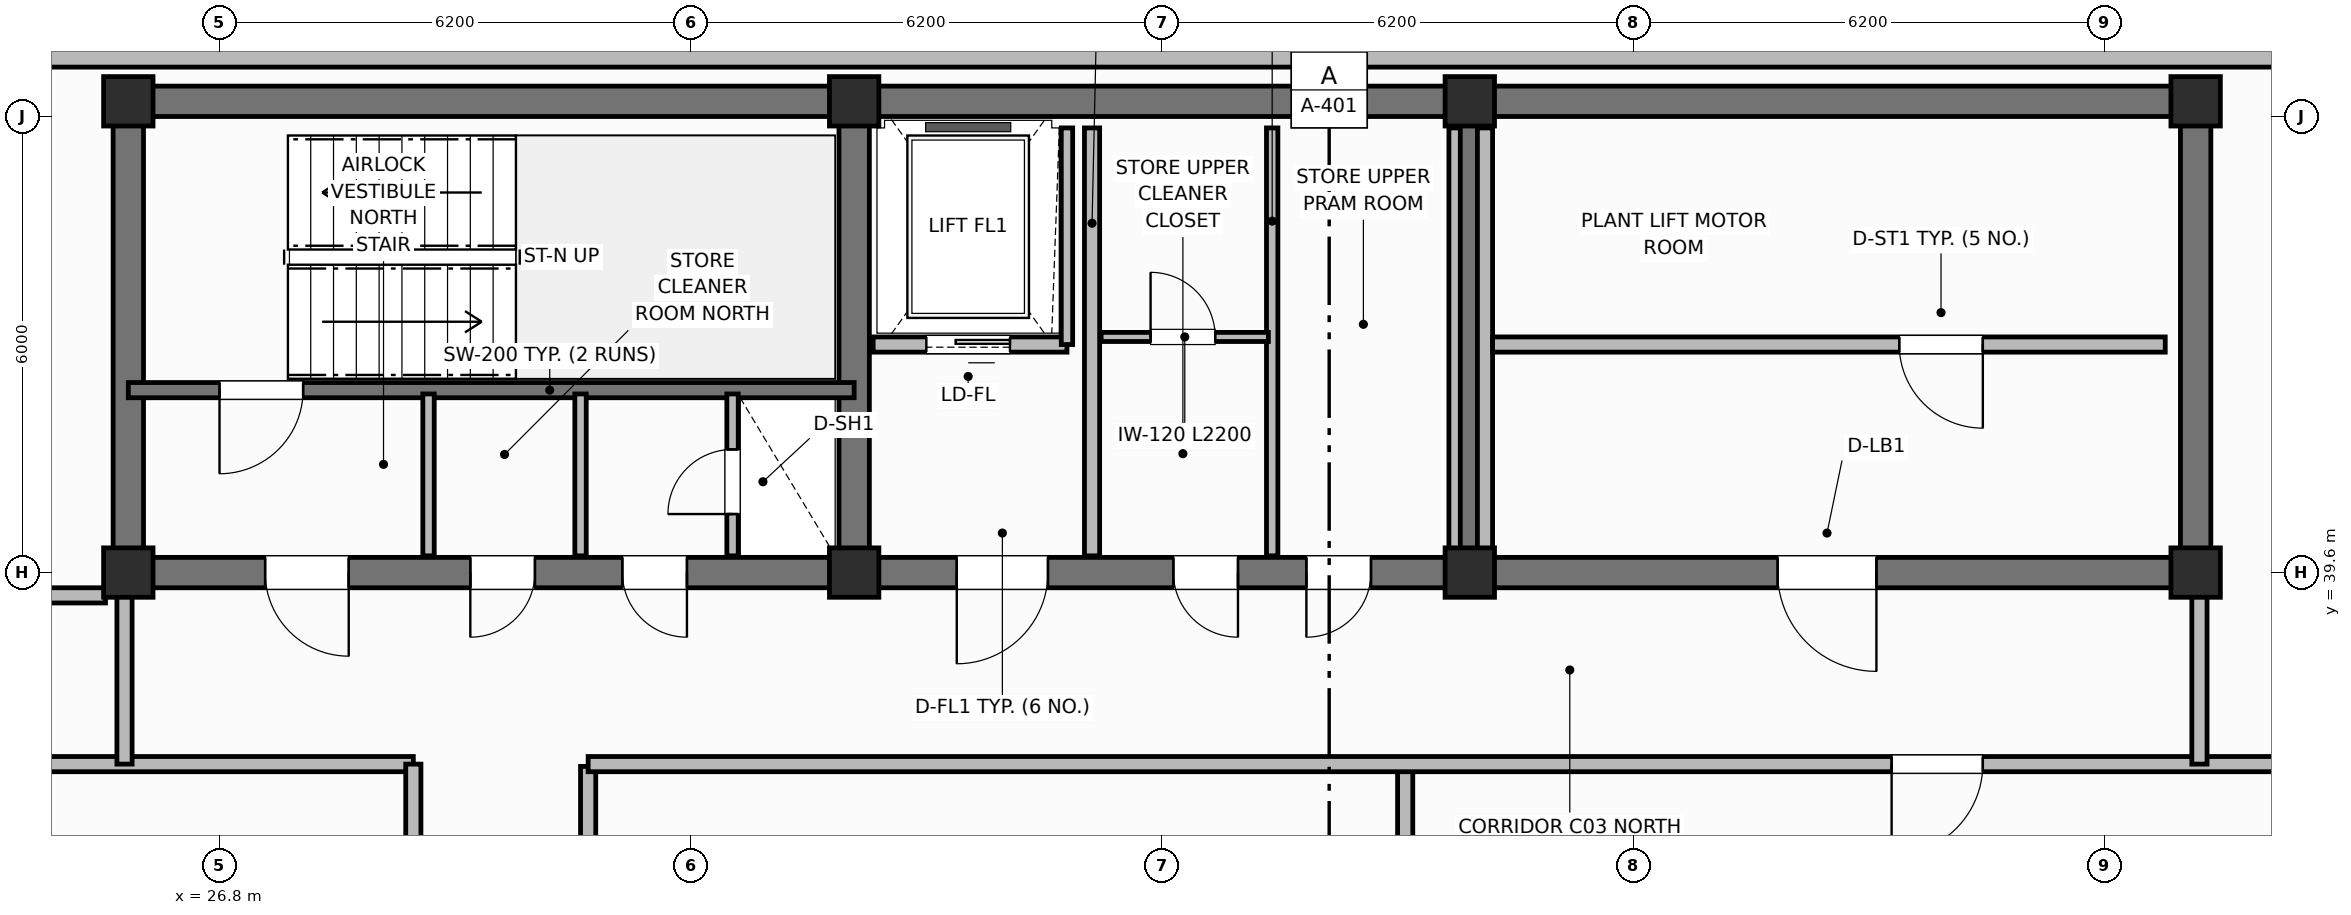
"""IFC4 building model, lengths in metres.
Left out: names, types, materials, properties, quantities, classifications, styles, units other than length and angle.
Written with IfcOpenShell. Run it as: python <this file> out.ifc"""

import sys

from ifc_helpers import new_model, si_unit, direction, frame, frame_2d, origin, origin_2d, place, context, subcontext, project, spatial, rectangle, extrude, element, fill, save


model = new_model("IFC4")
c1 = context("Model", 3, precision=1e-05, world=origin(), true_north=direction((0.0, 1.0)))
c2 = subcontext(c1, "Body", "Model", "MODEL_VIEW")
j1 = project(units=[si_unit("LENGTHUNIT", "METRE"), si_unit("PLANEANGLEUNIT", "RADIAN")], contexts=[c1])
p1 = place(None, origin())
s1 = spatial("IfcSite", under=j1, at=p1, CompositionType="ELEMENT")
p2 = place(p1, origin())
s2 = spatial("IfcBuilding", under=s1, at=p2, CompositionType="ELEMENT")
p3 = place(p2, frame((0.0, 0.0, 309.2)))
s3 = spatial("IfcBuildingStorey", under=s2, at=p3, CompositionType="ELEMENT", Elevation=309.2)
p4 = place(p3, frame((25.6, 45.8, 0.0), z_axis=(0.0, 0.0, 1.0), x_axis=(1.0, 0.0, 0.0)))
e1 = element("IfcWall", 1, at=p4, inside=s3, PredefinedType="SHEAR", context=c2, shape_type="SweptSolid", body=[
    extrude(rectangle(XDim=27.2, YDim=0.4, at=frame_2d((13.6, 0.0))), origin(), (0.0, 0.0, 1.0), 3.6),
])
for number, where, z_axis, x_axis in (
    (2, (25.6, 39.8, 0.0), (0.0, 0.0, 1.0), (0.0, 1.0, 0.0)),
    (3, (52.8, 39.8, 0.0), (0.0, 0.0, 1.0), (0.0, 1.0, 0.0)),
):
    element("IfcWall", number, at=place(p3, frame(where, z_axis=z_axis, x_axis=x_axis)), inside=s3, PredefinedType="SHEAR", context=c2, shape_type="SweptSolid", body=[
        extrude(rectangle(XDim=5.8, YDim=0.4, at=frame_2d((2.9, 0.0))), origin(), (0.0, 0.0, 1.0), 3.6),
    ])
p5 = place(p3, frame((52.8, 39.6, 0.0), z_axis=(0.0, 0.0, 1.0), x_axis=(-1.0, 0.0, 0.0)))
e4 = element("IfcWall", 4, at=p5, inside=s3, PredefinedType="SHEAR", context=c2, shape_type="SweptSolid", body=[
    extrude(rectangle(XDim=27.2, YDim=0.4, at=frame_2d((13.6, 0.0))), origin(), (0.0, 0.0, 1.0), 3.6),
])
p6 = place(p5, frame((24.3, 0.0, 0.0)))
e5 = element("IfcOpeningElement", 5, at=p6, cuts=e4, PredefinedType="OPENING", context=c2, shape_type="SweptSolid", body=[
    extrude(rectangle(XDim=1.1, YDim=2.15, at=frame_2d((0.55, 1.075))), frame((0.0, 0.21, 0.0), z_axis=(0.0, -1.0, 0.0), x_axis=(1.0, 0.0, 0.0)), (0.0, 0.0, 1.0), 0.42),
])
p7 = place(p5, frame((21.85, 0.0, 0.0)))
e6 = element("IfcOpeningElement", 6, at=p7, cuts=e4, PredefinedType="OPENING", context=c2, shape_type="SweptSolid", body=[
    extrude(rectangle(XDim=0.85, YDim=2.1, at=frame_2d((0.425, 1.05))), frame((0.0, 0.21, 0.0), z_axis=(0.0, -1.0, 0.0), x_axis=(1.0, 0.0, 0.0)), (0.0, 0.0, 1.0), 0.42),
])
p8 = place(p5, frame((19.85, 0.0, 0.0)))
e7 = element("IfcOpeningElement", 7, at=p8, cuts=e4, PredefinedType="OPENING", context=c2, shape_type="SweptSolid", body=[
    extrude(rectangle(XDim=0.85, YDim=2.1, at=frame_2d((0.425, 1.05))), frame((0.0, 0.21, 0.0), z_axis=(0.0, -1.0, 0.0), x_axis=(1.0, 0.0, 0.0)), (0.0, 0.0, 1.0), 0.42),
])
p9 = place(p5, frame((15.1, 0.0, 0.0)))
e8 = element("IfcOpeningElement", 8, at=p9, cuts=e4, PredefinedType="OPENING", context=c2, shape_type="SweptSolid", body=[
    extrude(rectangle(XDim=1.2, YDim=2.15, at=frame_2d((0.6, 1.075))), frame((0.0, 0.21, 0.0), z_axis=(0.0, -1.0, 0.0), x_axis=(1.0, 0.0, 0.0)), (0.0, 0.0, 1.0), 0.42),
])
p10 = place(p5, frame((12.6, 0.0, 0.0)))
e9 = element("IfcOpeningElement", 9, at=p10, cuts=e4, PredefinedType="OPENING", context=c2, shape_type="SweptSolid", body=[
    extrude(rectangle(XDim=0.85, YDim=2.1, at=frame_2d((0.425, 1.05))), frame((0.0, 0.21, 0.0), z_axis=(0.0, -1.0, 0.0), x_axis=(1.0, 0.0, 0.0)), (0.0, 0.0, 1.0), 0.42),
])
p11 = place(p5, frame((10.85, 0.0, 0.0)))
e10 = element("IfcOpeningElement", 10, at=p11, cuts=e4, PredefinedType="OPENING", context=c2, shape_type="SweptSolid", body=[
    extrude(rectangle(XDim=0.85, YDim=2.1, at=frame_2d((0.425, 1.05))), frame((0.0, 0.21, 0.0), z_axis=(0.0, -1.0, 0.0), x_axis=(1.0, 0.0, 0.0)), (0.0, 0.0, 1.0), 0.42),
])
p12 = place(p5, frame((4.2, 0.0, 0.0)))
e11 = element("IfcOpeningElement", 11, at=p12, cuts=e4, PredefinedType="OPENING", context=c2, shape_type="SweptSolid", body=[
    extrude(rectangle(XDim=1.3, YDim=2.2, at=frame_2d((0.65, 1.1))), frame((0.0, 0.21, 0.0), z_axis=(0.0, -1.0, 0.0), x_axis=(1.0, 0.0, 0.0)), (0.0, 0.0, 1.0), 0.42),
])
for number, where, z_axis, x_axis in (
    (12, (35.15, 39.8, 0.0), (0.0, 0.0, 1.0), (0.0, 1.0, 0.0)),
    (13, (43.25, 39.8, 0.0), (0.0, 0.0, 1.0), (0.0, 1.0, 0.0)),
):
    element("IfcWall", number, at=place(p3, frame(where, z_axis=z_axis, x_axis=x_axis)), inside=s3, PredefinedType="SHEAR", context=c2, shape_type="SweptSolid", body=[
        extrude(rectangle(XDim=5.8, YDim=0.4, at=frame_2d((2.9, 0.0))), origin(), (0.0, 0.0, 1.0), 3.6),
    ])
for number, where, z_axis, x_axis in (
    (14, (25.6, 39.6, 0.0), (0.0, 0.0, 1.0), (1.0, 0.0, 0.0)),
    (15, (25.6, 45.8, 0.0), (0.0, 0.0, 1.0), (1.0, 0.0, 0.0)),
    (16, (35.15, 39.6, 0.0), (0.0, 0.0, 1.0), (1.0, 0.0, 0.0)),
    (17, (35.15, 45.8, 0.0), (0.0, 0.0, 1.0), (1.0, 0.0, 0.0)),
    (18, (43.25, 39.6, 0.0), (0.0, 0.0, 1.0), (1.0, 0.0, 0.0)),
    (19, (43.25, 45.8, 0.0), (0.0, 0.0, 1.0), (1.0, 0.0, 0.0)),
    (20, (52.8, 39.6, 0.0), (0.0, 0.0, 1.0), (1.0, 0.0, 0.0)),
    (21, (52.8, 45.8, 0.0), (0.0, 0.0, 1.0), (1.0, 0.0, 0.0)),
):
    element("IfcColumn", number, at=place(p3, frame(where, z_axis=z_axis, x_axis=x_axis)), inside=s3, PredefinedType="COLUMN", context=c2, shape_type="SweptSolid", body=[
        extrude(rectangle(XDim=0.65, YDim=0.65, at=origin_2d()), origin(), (0.0, 0.0, 1.0), 3.6),
    ])
p13 = place(p3, frame((54.64, 46.4, 0.0), z_axis=(0.0, 0.0, 1.0), x_axis=(-1.0, 0.0, 0.0)))
e22 = element("IfcWall", 22, at=p13, inside=s3, PredefinedType="SOLIDWALL", context=c2, shape_type="SweptSolid", body=[
    extrude(rectangle(XDim=30.88, YDim=0.3, at=frame_2d((15.44, 0.0))), origin(), (0.0, 0.0, 1.0), 2.84),
])
p14 = place(p3, frame((35.15, 42.0, 0.0), z_axis=(0.0, 0.0, 1.0), x_axis=(-1.0, 0.0, 0.0)))
e23 = element("IfcWall", 23, at=p14, inside=s3, PredefinedType="SHEAR", context=c2, shape_type="SweptSolid", body=[
    extrude(rectangle(XDim=9.55, YDim=0.2, at=frame_2d((4.775, 0.0))), origin(), (0.0, 0.0, 1.0), 3.6),
])
p15 = place(p14, frame((7.25, 0.0, 0.0)))
e24 = element("IfcOpeningElement", 24, at=p15, cuts=e23, PredefinedType="OPENING", context=c2, shape_type="SweptSolid", body=[
    extrude(rectangle(XDim=1.1, YDim=2.15, at=frame_2d((0.55, 1.075))), frame((0.0, 0.11, 0.0), z_axis=(0.0, -1.0, 0.0), x_axis=(1.0, 0.0, 0.0)), (0.0, 0.0, 1.0), 0.22),
])
p16 = place(p3, frame((33.55, 39.82, 0.0), z_axis=(0.0, 0.0, 1.0), x_axis=(0.0, 1.0, 0.0)))
e25 = element("IfcWall", 25, at=p16, inside=s3, PredefinedType="PARTITIONING", context=c2, shape_type="SweptSolid", body=[
    extrude(rectangle(XDim=2.13, YDim=0.15, at=frame_2d((1.065, 0.0))), origin(), (0.0, 0.0, 1.0), 2.54),
])
p17 = place(p16, frame((0.55, 0.0, 0.0)))
e26 = element("IfcOpeningElement", 26, at=p17, cuts=e25, PredefinedType="OPENING", context=c2, shape_type="SweptSolid", body=[
    extrude(rectangle(XDim=0.85, YDim=2.05, at=frame_2d((0.425, 1.025))), frame((0.0, 0.085, 0.0), z_axis=(0.0, -1.0, 0.0), x_axis=(1.0, 0.0, 0.0)), (0.0, 0.0, 1.0), 0.17),
])
for number, where, z_axis, x_axis in (
    (27, (29.55, 39.82, 0.0), (0.0, 0.0, 1.0), (0.0, 1.0, 0.0)),
    (28, (31.55, 39.82, 0.0), (0.0, 0.0, 1.0), (0.0, 1.0, 0.0)),
):
    element("IfcWall", number, at=place(p3, frame(where, z_axis=z_axis, x_axis=x_axis)), inside=s3, PredefinedType="PARTITIONING", context=c2, shape_type="SweptSolid", body=[
        extrude(rectangle(XDim=2.13, YDim=0.15, at=frame_2d((1.065, 0.0))), origin(), (0.0, 0.0, 1.0), 2.54),
    ])
p18 = place(p3, frame((37.95, 42.6, 0.0), z_axis=(0.0, 0.0, 1.0), x_axis=(-1.0, 0.0, 0.0)))
e29 = element("IfcWall", 29, at=p18, inside=s3, PredefinedType="PARTITIONING", context=c2, shape_type="SweptSolid", body=[
    extrude(rectangle(XDim=2.55, YDim=0.2, at=frame_2d((1.275, 0.0))), origin(), (0.0, 0.0, 1.0), 2.2),
])
p19 = place(p18, frame((0.75, 0.0, 0.0)))
e30 = element("IfcOpeningElement", 30, at=p19, cuts=e29, PredefinedType="OPENING", context=c2, shape_type="SweptSolid", body=[
    extrude(rectangle(XDim=1.1, YDim=2.15, at=frame_2d((0.55, 1.075))), frame((0.0, 0.11, 0.0), z_axis=(0.0, -1.0, 0.0), x_axis=(1.0, 0.0, 0.0)), (0.0, 0.0, 1.0), 0.22),
])
p20 = place(p3, frame((37.95, 42.6, 0.0), z_axis=(0.0, 0.0, 1.0), x_axis=(0.0, 1.0, 0.0)))
e31 = element("IfcWall", 31, at=p20, inside=s3, PredefinedType="PARTITIONING", context=c2, shape_type="SweptSolid", body=[
    extrude(rectangle(XDim=2.85, YDim=0.15, at=frame_2d((1.425, 0.0))), origin(), (0.0, 0.0, 1.0), 2.54),
])
p21 = place(p3, frame((38.28, 39.82, 0.0), z_axis=(0.0, 0.0, 1.0), x_axis=(0.0, 1.0, 0.0)))
e32 = element("IfcWall", 32, at=p21, inside=s3, PredefinedType="PARTITIONING", context=c2, shape_type="SweptSolid", body=[
    extrude(rectangle(XDim=5.63, YDim=0.2, at=frame_2d((2.815, 0.0))), origin(), (0.0, 0.0, 1.0), 2.54),
])
for number, where, z_axis, x_axis in (
    (33, (43.05, 39.82, 0.0), (0.0, 0.0, 1.0), (0.0, 1.0, 0.0)),
    (34, (40.65, 39.82, 0.0), (0.0, 0.0, 1.0), (0.0, 1.0, 0.0)),
):
    element("IfcWall", number, at=place(p3, frame(where, z_axis=z_axis, x_axis=x_axis)), inside=s3, PredefinedType="PARTITIONING", context=c2, shape_type="SweptSolid", body=[
        extrude(rectangle(XDim=5.63, YDim=0.15, at=frame_2d((2.815, 0.0))), origin(), (0.0, 0.0, 1.0), 2.54),
    ])
p22 = place(p3, frame((38.4, 42.7, 0.0), z_axis=(0.0, 0.0, 1.0), x_axis=(1.0, 0.0, 0.0)))
e35 = element("IfcWall", 35, at=p22, inside=s3, PredefinedType="PARTITIONING", context=c2, shape_type="SweptSolid", body=[
    extrude(rectangle(XDim=2.2, YDim=0.12, at=frame_2d((1.1, 0.0))), origin(), (0.0, 0.0, 1.0), 2.2),
])
p23 = place(p22, frame((0.65, 0.0, 0.0)))
e36 = element("IfcOpeningElement", 36, at=p23, cuts=e35, PredefinedType="OPENING", context=c2, shape_type="SweptSolid", body=[
    extrude(rectangle(XDim=0.85, YDim=2.1, at=frame_2d((0.425, 1.05))), frame((0.0, 0.07, 0.0), z_axis=(0.0, -1.0, 0.0), x_axis=(1.0, 0.0, 0.0)), (0.0, 0.0, 1.0), 0.14),
])
p24 = place(p3, frame((43.45, 39.82, 0.0), z_axis=(0.0, 0.0, 1.0), x_axis=(0.0, 1.0, 0.0)))
e37 = element("IfcWall", 37, at=p24, inside=s3, PredefinedType="PARTITIONING", context=c2, shape_type="SweptSolid", body=[
    extrude(rectangle(XDim=5.63, YDim=0.2, at=frame_2d((2.815, 0.0))), origin(), (0.0, 0.0, 1.0), 2.54),
])
p25 = place(p3, frame((52.4, 42.6, 0.0), z_axis=(0.0, 0.0, 1.0), x_axis=(-1.0, 0.0, 0.0)))
e38 = element("IfcWall", 38, at=p25, inside=s3, PredefinedType="PARTITIONING", context=c2, shape_type="SweptSolid", body=[
    extrude(rectangle(XDim=8.85, YDim=0.2, at=frame_2d((4.425, 0.0))), origin(), (0.0, 0.0, 1.0), 2.54),
])
p26 = place(p25, frame((2.4, 0.0, 0.0)))
e39 = element("IfcOpeningElement", 39, at=p26, cuts=e38, PredefinedType="OPENING", context=c2, shape_type="SweptSolid", body=[
    extrude(rectangle(XDim=1.1, YDim=2.15, at=frame_2d((0.55, 1.075))), frame((0.0, 0.11, 0.0), z_axis=(0.0, -1.0, 0.0), x_axis=(1.0, 0.0, 0.0)), (0.0, 0.0, 1.0), 0.22),
])
p27 = place(p3, frame((21.53, 37.08, 0.0), z_axis=(0.0, 0.0, 1.0), x_axis=(1.0, 0.0, 0.0)))
e40 = element("IfcWall", 40, at=p27, inside=s3, PredefinedType="PARTITIONING", context=c2, shape_type="SweptSolid", body=[
    extrude(rectangle(XDim=7.82, YDim=0.2, at=frame_2d((3.91, 0.0))), origin(), (0.0, 0.0, 1.0), 2.54),
])
p28 = place(p3, frame((29.35, 19.32, 0.0), z_axis=(0.0, 0.0, 1.0), x_axis=(0.0, 1.0, 0.0)))
e41 = element("IfcWall", 41, at=p28, inside=s3, PredefinedType="PARTITIONING", context=c2, shape_type="SweptSolid", body=[
    extrude(rectangle(XDim=17.76, YDim=0.2, at=frame_2d((8.88, 0.0))), origin(), (0.0, 0.0, 1.0), 2.54),
])
p29 = place(p28, frame((6.0, 0.0, 0.0)))
e42 = element("IfcOpeningElement", 42, at=p29, cuts=e41, PredefinedType="OPENING", context=c2, shape_type="SweptSolid", body=[
    extrude(rectangle(XDim=1.2, YDim=2.15, at=frame_2d((0.6, 1.075))), frame((0.0, 0.11, 0.0), z_axis=(0.0, -1.0, 0.0), x_axis=(1.0, 0.0, 0.0)), (0.0, 0.0, 1.0), 0.22),
])
p30 = place(p3, frame((31.65, 19.35, 0.0), z_axis=(0.0, 0.0, 1.0), x_axis=(0.0, 1.0, 0.0)))
e43 = element("IfcWall", 43, at=p30, inside=s3, PredefinedType="PARTITIONING", context=c2, shape_type="SweptSolid", body=[
    extrude(rectangle(XDim=17.7, YDim=0.2, at=frame_2d((8.85, 0.0))), origin(), (0.0, 0.0, 1.0), 2.54),
])
p31 = place(p30, frame((6.0, 0.0, 0.0)))
e44 = element("IfcOpeningElement", 44, at=p31, cuts=e43, PredefinedType="OPENING", context=c2, shape_type="SweptSolid", body=[
    extrude(rectangle(XDim=1.2, YDim=2.15, at=frame_2d((0.6, 1.075))), frame((0.0, 0.11, 0.0), z_axis=(0.0, -1.0, 0.0), x_axis=(1.0, 0.0, 0.0)), (0.0, 0.0, 1.0), 0.22),
])
p32 = place(p3, frame((42.4, 19.35, 0.0), z_axis=(0.0, 0.0, 1.0), x_axis=(0.0, 1.0, 0.0)))
e45 = element("IfcWall", 45, at=p32, inside=s3, PredefinedType="PARTITIONING", context=c2, shape_type="SweptSolid", body=[
    extrude(rectangle(XDim=17.7, YDim=0.2, at=frame_2d((8.85, 0.0))), origin(), (0.0, 0.0, 1.0), 2.54),
])
p33 = place(p3, frame((56.87, 37.08, 0.0), z_axis=(0.0, 0.0, 1.0), x_axis=(-1.0, 0.0, 0.0)))
e46 = element("IfcWall", 46, at=p33, inside=s3, PredefinedType="PARTITIONING", context=c2, shape_type="SweptSolid", body=[
    extrude(rectangle(XDim=25.22, YDim=0.2, at=frame_2d((12.61, 0.0))), origin(), (0.0, 0.0, 1.0), 2.54),
])
p34 = place(p33, frame((6.87, 0.0, 0.0)))
e47 = element("IfcOpeningElement", 47, at=p34, cuts=e46, PredefinedType="OPENING", context=c2, shape_type="SweptSolid", body=[
    extrude(rectangle(XDim=1.2, YDim=2.15, at=frame_2d((0.6, 1.075))), frame((0.0, 0.11, 0.0), z_axis=(0.0, -1.0, 0.0), x_axis=(1.0, 0.0, 0.0)), (0.0, 0.0, 1.0), 0.22),
])
for number, where, z_axis, x_axis in (
    (48, (52.85, 37.08, 0.0), (0.0, 0.0, 1.0), (0.0, 1.0, 0.0)),
    (49, (25.55, 37.08, 0.0), (0.0, 0.0, 1.0), (0.0, 1.0, 0.0)),
):
    element("IfcWall", number, at=place(p3, frame(where, z_axis=z_axis, x_axis=x_axis)), inside=s3, PredefinedType="PARTITIONING", context=c2, shape_type="SweptSolid", body=[
        extrude(rectangle(XDim=2.37, YDim=0.2, at=frame_2d((1.185, 0.0))), origin(), (0.0, 0.0, 1.0), 2.54),
    ])
p35 = place(p3, frame((21.53, 39.3, 0.0), z_axis=(0.0, 0.0, 1.0), x_axis=(1.0, 0.0, 0.0)))
e50 = element("IfcWall", 50, at=p35, inside=s3, PredefinedType="PARTITIONING", context=c2, shape_type="SweptSolid", body=[
    extrude(rectangle(XDim=3.77, YDim=0.2, at=frame_2d((1.885, 0.0))), origin(), (0.0, 0.0, 1.0), 2.54),
])
p36 = place(p15, origin())
e51 = element("IfcDoor", 51, at=p36, inside=s3, OperationType="SINGLE_SWING_RIGHT", PredefinedType="DOOR", context=c2, shape_type="SweptSolid", body=[
    extrude(rectangle(XDim=1.1, YDim=2.15, at=frame_2d((0.55, 1.075))), frame((0.0, 0.025, 0.0), z_axis=(0.0, -1.0, 0.0), x_axis=(1.0, 0.0, 0.0)), (0.0, 0.0, 1.0), 0.05),
])
fill(e24, e51)
p37 = place(p17, origin())
e52 = element("IfcDoor", 52, at=p37, inside=s3, OperationType="SINGLE_SWING_LEFT", PredefinedType="TRAPDOOR", context=c2, shape_type="SweptSolid", body=[
    extrude(rectangle(XDim=0.85, YDim=2.05, at=frame_2d((0.425, 1.025))), frame((0.0, 0.025, 0.0), z_axis=(0.0, -1.0, 0.0), x_axis=(1.0, 0.0, 0.0)), (0.0, 0.0, 1.0), 0.05),
])
fill(e26, e52)
p38 = place(p19, origin())
e53 = element("IfcDoor", 53, at=p38, inside=s3, OperationType="SLIDING_TO_LEFT", PredefinedType="DOOR", context=c2, shape_type="SweptSolid", body=[
    extrude(rectangle(XDim=1.1, YDim=2.15, at=frame_2d((0.55, 1.075))), frame((0.0, 0.025, 0.0), z_axis=(0.0, -1.0, 0.0), x_axis=(1.0, 0.0, 0.0)), (0.0, 0.0, 1.0), 0.05),
])
fill(e30, e53)
p39 = place(p23, origin())
e54 = element("IfcDoor", 54, at=p39, inside=s3, OperationType="SINGLE_SWING_LEFT", PredefinedType="DOOR", context=c2, shape_type="SweptSolid", body=[
    extrude(rectangle(XDim=0.85, YDim=2.1, at=frame_2d((0.425, 1.05))), frame((0.0, 0.025, 0.0), z_axis=(0.0, -1.0, 0.0), x_axis=(1.0, 0.0, 0.0)), (0.0, 0.0, 1.0), 0.05),
])
fill(e36, e54)
p40 = place(p26, origin())
e55 = element("IfcDoor", 55, at=p40, inside=s3, OperationType="SINGLE_SWING_LEFT", PredefinedType="DOOR", context=c2, shape_type="SweptSolid", body=[
    extrude(rectangle(XDim=1.1, YDim=2.15, at=frame_2d((0.55, 1.075))), frame((0.0, 0.025, 0.0), z_axis=(0.0, -1.0, 0.0), x_axis=(1.0, 0.0, 0.0)), (0.0, 0.0, 1.0), 0.05),
])
fill(e39, e55)
p41 = place(p34, origin())
e56 = element("IfcDoor", 56, at=p41, inside=s3, OperationType="SINGLE_SWING_RIGHT", PredefinedType="DOOR", context=c2, shape_type="SweptSolid", body=[
    extrude(rectangle(XDim=1.2, YDim=2.15, at=frame_2d((0.6, 1.075))), frame((0.0, 0.025, 0.0), z_axis=(0.0, -1.0, 0.0), x_axis=(1.0, 0.0, 0.0)), (0.0, 0.0, 1.0), 0.05),
])
fill(e47, e56)
p42 = place(p6, origin())
e57 = element("IfcDoor", 57, at=p42, inside=s3, OperationType="SINGLE_SWING_LEFT", PredefinedType="DOOR", context=c2, shape_type="SweptSolid", body=[
    extrude(rectangle(XDim=1.1, YDim=2.15, at=frame_2d((0.55, 1.075))), frame((0.0, 0.025, 0.0), z_axis=(0.0, -1.0, 0.0), x_axis=(1.0, 0.0, 0.0)), (0.0, 0.0, 1.0), 0.05),
])
fill(e5, e57)
p43 = place(p7, origin())
e58 = element("IfcDoor", 58, at=p43, inside=s3, OperationType="SINGLE_SWING_RIGHT", PredefinedType="DOOR", context=c2, shape_type="SweptSolid", body=[
    extrude(rectangle(XDim=0.85, YDim=2.1, at=frame_2d((0.425, 1.05))), frame((0.0, 0.025, 0.0), z_axis=(0.0, -1.0, 0.0), x_axis=(1.0, 0.0, 0.0)), (0.0, 0.0, 1.0), 0.05),
])
fill(e6, e58)
p44 = place(p8, origin())
e59 = element("IfcDoor", 59, at=p44, inside=s3, OperationType="SINGLE_SWING_LEFT", PredefinedType="DOOR", context=c2, shape_type="SweptSolid", body=[
    extrude(rectangle(XDim=0.85, YDim=2.1, at=frame_2d((0.425, 1.05))), frame((0.0, 0.025, 0.0), z_axis=(0.0, -1.0, 0.0), x_axis=(1.0, 0.0, 0.0)), (0.0, 0.0, 1.0), 0.05),
])
fill(e7, e59)
p45 = place(p9, origin())
e60 = element("IfcDoor", 60, at=p45, inside=s3, OperationType="SINGLE_SWING_RIGHT", PredefinedType="DOOR", context=c2, shape_type="SweptSolid", body=[
    extrude(rectangle(XDim=1.2, YDim=2.15, at=frame_2d((0.6, 1.075))), frame((0.0, 0.025, 0.0), z_axis=(0.0, -1.0, 0.0), x_axis=(1.0, 0.0, 0.0)), (0.0, 0.0, 1.0), 0.05),
])
fill(e8, e60)
p46 = place(p10, origin())
e61 = element("IfcDoor", 61, at=p46, inside=s3, OperationType="SINGLE_SWING_LEFT", PredefinedType="DOOR", context=c2, shape_type="SweptSolid", body=[
    extrude(rectangle(XDim=0.85, YDim=2.1, at=frame_2d((0.425, 1.05))), frame((0.0, 0.025, 0.0), z_axis=(0.0, -1.0, 0.0), x_axis=(1.0, 0.0, 0.0)), (0.0, 0.0, 1.0), 0.05),
])
fill(e9, e61)
p47 = place(p11, origin())
e62 = element("IfcDoor", 62, at=p47, inside=s3, OperationType="SINGLE_SWING_RIGHT", PredefinedType="DOOR", context=c2, shape_type="SweptSolid", body=[
    extrude(rectangle(XDim=0.85, YDim=2.1, at=frame_2d((0.425, 1.05))), frame((0.0, 0.025, 0.0), z_axis=(0.0, -1.0, 0.0), x_axis=(1.0, 0.0, 0.0)), (0.0, 0.0, 1.0), 0.05),
])
fill(e10, e62)
p48 = place(p12, origin())
e63 = element("IfcDoor", 63, at=p48, inside=s3, OperationType="SINGLE_SWING_LEFT", PredefinedType="DOOR", context=c2, shape_type="SweptSolid", body=[
    extrude(rectangle(XDim=1.3, YDim=2.2, at=frame_2d((0.65, 1.1))), frame((0.0, 0.025, 0.0), z_axis=(0.0, -1.0, 0.0), x_axis=(1.0, 0.0, 0.0)), (0.0, 0.0, 1.0), 0.05),
])
fill(e11, e63)
save(model, sys.argv[1])
